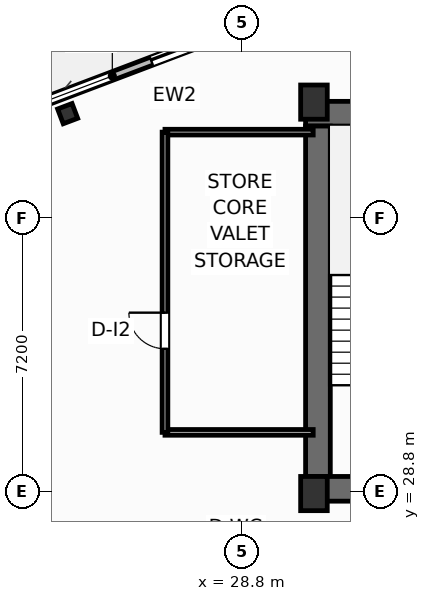
"""IFC4 building model, lengths in metres.
Left out: names, types, materials, properties, quantities, classifications, styles, units other than length and angle.
Written with IfcOpenShell. Run it as: python <this file> out.ifc"""

import sys

from ifc_helpers import new_model, si_unit, direction, frame, frame_2d, origin, origin_2d, place, context, subcontext, project, spatial, rectangle, i_section, extrude, element, fill, save


model = new_model("IFC4")
c1 = context("Model", 3, precision=1e-05, world=origin(), true_north=direction((0.0, 1.0)))
c2 = subcontext(c1, "Body", "Model", "MODEL_VIEW")
j1 = project(units=[si_unit("LENGTHUNIT", "METRE"), si_unit("PLANEANGLEUNIT", "RADIAN")], contexts=[c1])
p1 = place(None, origin())
s1 = spatial("IfcSite", under=j1, at=p1, CompositionType="ELEMENT")
p2 = place(p1, origin())
s2 = spatial("IfcBuilding", under=s1, at=p2, CompositionType="ELEMENT")
p3 = place(p2, frame((0.0, 0.0, 216.4)))
s3 = spatial("IfcBuildingStorey", under=s2, at=p3, CompositionType="ELEMENT", Elevation=216.4)
for number, where, z_axis, x_axis in (
    (1, (30.7, 28.75, 0.0), (0.0, 0.0, 1.0), (1.0, 0.0, 0.0)),
    (2, (30.7, 39.05, 0.0), (0.0, 0.0, 1.0), (1.0, 0.0, 0.0)),
):
    element("IfcColumn", number, at=place(p3, frame(where, z_axis=z_axis, x_axis=x_axis)), inside=s3, PredefinedType="COLUMN", context=c2, shape_type="SweptSolid", body=[
        extrude(rectangle(XDim=0.7, YDim=0.9, at=origin_2d()), origin(), (0.0, 0.0, 1.0), 3.7),
    ])
p4 = place(p3, frame((30.48, 38.745, 0.0), z_axis=(0.0, 0.0, 1.0), x_axis=(1.0, 0.0, 0.0)))
e3 = element("IfcWall", 3, at=p4, inside=s3, PredefinedType="SHEAR", context=c2, shape_type="SweptSolid", body=[
    extrude(rectangle(XDim=17.44, YDim=0.65, at=frame_2d((8.72, 0.0))), origin(), (0.0, 0.0, 1.0), 3.45),
])
p5 = place(p3, frame((30.805, 29.2, 0.0), z_axis=(0.0, 0.0, 1.0), x_axis=(0.0, 1.0, 0.0)))
e4 = element("IfcWall", 4, at=p5, inside=s3, PredefinedType="SHEAR", context=c2, shape_type="SweptSolid", body=[
    extrude(rectangle(XDim=9.22, YDim=0.65, at=frame_2d((4.61, 0.0))), origin(), (0.0, 0.0, 1.0), 3.45),
])
p6 = place(p3, frame((30.48, 28.875, 0.0), z_axis=(0.0, 0.0, 1.0), x_axis=(1.0, 0.0, 0.0)))
e5 = element("IfcWall", 5, at=p6, inside=s3, PredefinedType="SHEAR", context=c2, shape_type="SweptSolid", body=[
    extrude(rectangle(XDim=4.32, YDim=0.65, at=frame_2d((2.16, 0.0))), origin(), (0.0, 0.0, 1.0), 3.45),
])
p7 = place(p3, frame((24.219, 38.747, 0.0), z_axis=(0.0, 0.0, 1.0), x_axis=(0.935221751401, 0.354062530786, 0.0)))
e6 = element("IfcColumn", 6, at=p7, inside=s3, PredefinedType="COLUMN", context=c2, shape_type="SweptSolid", body=[
    extrude(i_section(OverallWidth=0.406, OverallDepth=0.416, WebThickness=0.03, FlangeThickness=0.048, FilletRadius=0.025, at=origin_2d()), origin(), (0.0, 0.0, 1.0), 3.7),
])
p8 = place(p3, frame((23.149, 38.887, 0.0), z_axis=(0.0, 0.0, 1.0), x_axis=(0.9352192676, 0.354069091436, 0.0)))
e7 = element("IfcWall", 7, at=p8, inside=s3, PredefinedType="SOLIDWALL", context=c2, shape_type="SweptSolid", body=[
    extrude(rectangle(XDim=6.0, YDim=0.22, at=frame_2d((3.0, 0.0))), origin(), (0.0, 0.0, 1.0), 2.73),
])
p9 = place(p8, frame((3.5, 0.0, 0.0)))
e8 = element("IfcOpeningElement", 8, at=p9, cuts=e7, PredefinedType="OPENING", context=c2, shape_type="SweptSolid", body=[
    extrude(rectangle(XDim=2.1, YDim=2.3, at=frame_2d((1.05, 1.15))), frame((0.0, 0.12, 0.0), z_axis=(0.0, -1.0, 0.0), x_axis=(1.0, 0.0, 0.0)), (0.0, 0.0, 1.0), 0.24),
])
p10 = place(p8, frame((0.55, 0.0, 0.75)))
e9 = element("IfcOpeningElement", 9, at=p10, cuts=e7, PredefinedType="OPENING", context=c2, shape_type="SweptSolid", body=[
    extrude(rectangle(XDim=1.85, YDim=1.75, at=frame_2d((0.925, 0.875))), frame((0.0, 0.12, 0.0), z_axis=(0.0, -1.0, 0.0), x_axis=(1.0, 0.0, 0.0)), (0.0, 0.0, 1.0), 0.24),
])
for number, where, z_axis, x_axis in (
    (10, (26.78, 30.36, 0.0), (0.0, 0.0, 1.0), (1.0, 0.0, 0.0)),
    (11, (26.78, 38.26, 0.0), (0.0, 0.0, 1.0), (1.0, 0.0, 0.0)),
):
    element("IfcWall", number, at=place(p3, frame(where, z_axis=z_axis, x_axis=x_axis)), inside=s3, PredefinedType="PARTITIONING", context=c2, shape_type="SweptSolid", body=[
        extrude(rectangle(XDim=3.9, YDim=0.15, at=frame_2d((1.95, 0.0))), origin(), (0.0, 0.0, 1.0), 3.45),
    ])
p11 = place(p3, frame((26.78, 30.36, 0.0), z_axis=(0.0, 0.0, 1.0), x_axis=(0.0, 1.0, 0.0)))
e12 = element("IfcWall", 12, at=p11, inside=s3, PredefinedType="PARTITIONING", context=c2, shape_type="SweptSolid", body=[
    extrude(rectangle(XDim=7.9, YDim=0.15, at=frame_2d((3.95, 0.0))), origin(), (0.0, 0.0, 1.0), 3.45),
])
p12 = place(p11, frame((2.2, 0.0, 0.0)))
e13 = element("IfcOpeningElement", 13, at=p12, cuts=e12, PredefinedType="OPENING", context=c2, shape_type="SweptSolid", body=[
    extrude(rectangle(XDim=0.95, YDim=2.05, at=frame_2d((0.475, 1.025))), frame((0.0, 0.085, 0.0), z_axis=(0.0, -1.0, 0.0), x_axis=(1.0, 0.0, 0.0)), (0.0, 0.0, 1.0), 0.17),
])
p13 = place(p9, origin())
e14 = element("IfcDoor", 14, at=p13, inside=s3, OperationType="SLIDING_TO_LEFT", PredefinedType="DOOR", context=c2, shape_type="SweptSolid", body=[
    extrude(rectangle(XDim=2.1, YDim=2.3, at=frame_2d((1.05, 1.15))), frame((0.0, 0.025, 0.0), z_axis=(0.0, -1.0, 0.0), x_axis=(1.0, 0.0, 0.0)), (0.0, 0.0, 1.0), 0.05),
])
fill(e8, e14)
p14 = place(p10, origin())
e15 = element("IfcWindow", 15, at=p14, inside=s3, PartitioningType="SINGLE_PANEL", PredefinedType="WINDOW", context=c2, shape_type="SweptSolid", body=[
    extrude(rectangle(XDim=1.85, YDim=1.75, at=frame_2d((0.925, 0.875))), frame((0.0, 0.03, 0.0), z_axis=(0.0, -1.0, 0.0), x_axis=(1.0, 0.0, 0.0)), (0.0, 0.0, 1.0), 0.06),
])
fill(e9, e15)
p15 = place(p12, origin())
e16 = element("IfcDoor", 16, at=p15, inside=s3, OperationType="SINGLE_SWING_RIGHT", PredefinedType="DOOR", context=c2, shape_type="SweptSolid", body=[
    extrude(rectangle(XDim=0.95, YDim=2.05, at=frame_2d((0.475, 1.025))), frame((0.0, 0.025, 0.0), z_axis=(0.0, -1.0, 0.0), x_axis=(1.0, 0.0, 0.0)), (0.0, 0.0, 1.0), 0.05),
])
fill(e13, e16)
save(model, sys.argv[1])
